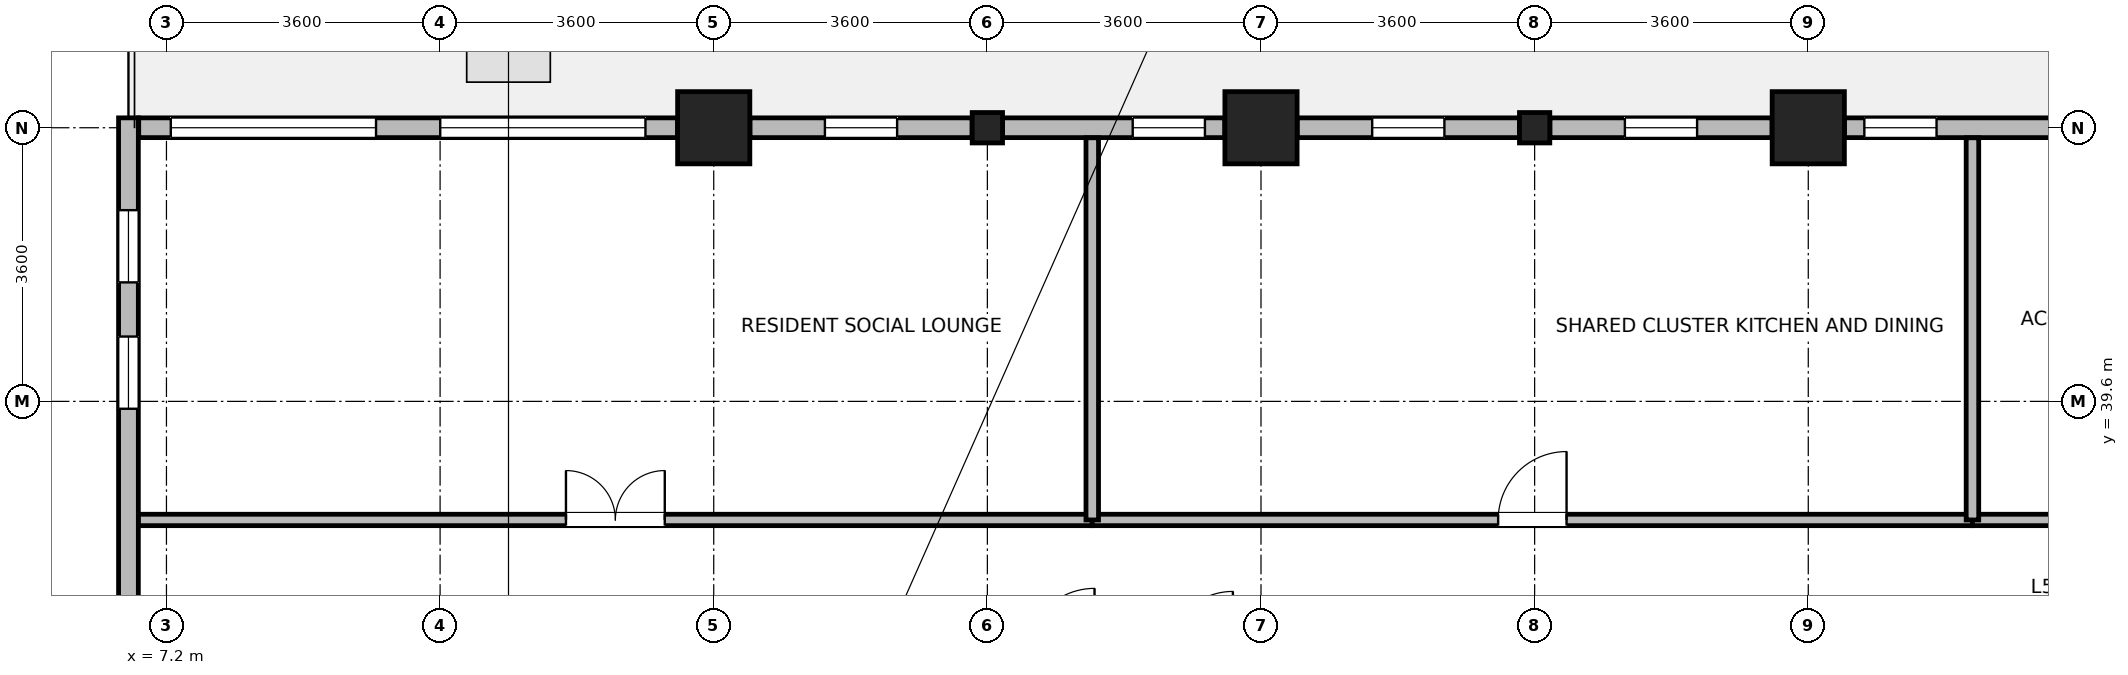
"""IFC4 building model, lengths in metres.
Left out: names, types, materials, properties, quantities, classifications, styles, units other than length and angle.
Written with IfcOpenShell. Run it as: python <this file> out.ifc"""

import sys

from ifc_helpers import new_model, si_unit, direction, frame, frame_2d, origin, origin_2d, place, context, subcontext, project, spatial, rectangle, i_section, extrude, source, transform, mapped, element, fill, save


model = new_model("IFC4")
c1 = context("Model", 3, precision=1e-05, world=origin(), true_north=direction((0.0, 1.0)))
c2 = subcontext(c1, "Body", "Model", "MODEL_VIEW")
j1 = project(units=[si_unit("LENGTHUNIT", "METRE"), si_unit("PLANEANGLEUNIT", "RADIAN")], contexts=[c1])
p1 = place(None, origin())
s1 = spatial("IfcSite", under=j1, at=p1, CompositionType="ELEMENT")
p2 = place(p1, origin())
s2 = spatial("IfcBuilding", under=s1, at=p2, CompositionType="ELEMENT")
p3 = place(p2, frame((0.0, 0.0, 197.2)))
s3 = spatial("IfcBuildingStorey", under=s2, at=p3, CompositionType="ELEMENT", Elevation=197.2)
m1 = source(origin(), c2, "Body", "SweptSolid", [
    extrude(rectangle(XDim=0.95, YDim=0.95, at=origin_2d()), origin(), (0.0, 0.0, 1.0), 4.6),
])
for number, where, z_axis, x_axis in (
    (1, (14.4, 43.2, 0.0), (0.0, 0.0, 1.0), (1.0, 0.0, 0.0)),
    (2, (21.6, 43.2, 0.0), (0.0, 0.0, 1.0), (1.0, 0.0, 0.0)),
    (3, (28.8, 43.2, 0.0), (0.0, 0.0, 1.0), (1.0, 0.0, 0.0)),
):
    element("IfcColumn", number, at=place(p3, frame(where, z_axis=z_axis, x_axis=x_axis)), inside=s3, PredefinedType="COLUMN", context=c2, shape_type="MappedRepresentation", body=[
        mapped(m1, transform((0.0, 0.0, 0.0), x_axis=(1.0, 0.0, 0.0), y_axis=(0.0, 1.0, 0.0), z_axis=(0.0, 0.0, 1.0), scale=1.0)),
    ])
m2 = source(origin(), c2, "Body", "SweptSolid", [
    extrude(i_section(OverallWidth=0.399, OverallDepth=0.4, WebThickness=0.017, FlangeThickness=0.023, FilletRadius=0.015, at=origin_2d()), origin(), (0.0, 0.0, 1.0), 4.6),
])
for number, where, z_axis, x_axis in (
    (4, (18.0, 43.2, 0.0), (0.0, 0.0, 1.0), (1.0, 0.0, 0.0)),
    (5, (25.2, 43.2, 0.0), (0.0, 0.0, 1.0), (1.0, 0.0, 0.0)),
):
    element("IfcColumn", number, at=place(p3, frame(where, z_axis=z_axis, x_axis=x_axis)), inside=s3, PredefinedType="COLUMN", context=c2, shape_type="MappedRepresentation", body=[
        mapped(m2, transform((0.0, 0.0, 0.0), x_axis=(1.0, 0.0, 0.0), y_axis=(0.0, 1.0, 0.0), z_axis=(0.0, 0.0, 1.0), scale=1.0)),
    ])
p4 = place(p3, frame((29.276, 43.2, 0.0), z_axis=(0.0, 0.0, 1.0), x_axis=(1.0, 0.0, 0.0)))
e6 = element("IfcWall", 6, at=p4, inside=s3, PredefinedType="STANDARD", context=c2, shape_type="SweptSolid", body=[
    extrude(rectangle(XDim=2.924, YDim=0.26, at=frame_2d((1.462, 0.0))), origin(), (0.0, 0.0, 1.0), 3.9),
])
p5 = place(p4, frame((0.262, 0.0, 0.85)))
e7 = element("IfcOpeningElement", 7, at=p5, cuts=e6, PredefinedType="OPENING", context=c2, shape_type="SweptSolid", body=[
    extrude(rectangle(XDim=0.95, YDim=1.75, at=frame_2d((0.475, 0.875))), frame((0.0, 0.14, 0.0), z_axis=(0.0, -1.0, 0.0), x_axis=(1.0, 0.0, 0.0)), (0.0, 0.0, 1.0), 0.28),
])
p6 = place(p3, frame((25.4, 43.2, 0.0), z_axis=(0.0, 0.0, 1.0), x_axis=(1.0, 0.0, 0.0)))
e8 = element("IfcWall", 8, at=p6, inside=s3, PredefinedType="STANDARD", context=c2, shape_type="SweptSolid", body=[
    extrude(rectangle(XDim=2.924, YDim=0.26, at=frame_2d((1.462, 0.0))), origin(), (0.0, 0.0, 1.0), 3.9),
])
p7 = place(p6, frame((0.987, 0.0, 0.85)))
e9 = element("IfcOpeningElement", 9, at=p7, cuts=e8, PredefinedType="OPENING", context=c2, shape_type="SweptSolid", body=[
    extrude(rectangle(XDim=0.95, YDim=1.75, at=frame_2d((0.475, 0.875))), frame((0.0, 0.14, 0.0), z_axis=(0.0, -1.0, 0.0), x_axis=(1.0, 0.0, 0.0)), (0.0, 0.0, 1.0), 0.28),
])
p8 = place(p3, frame((22.076, 43.2, 0.0), z_axis=(0.0, 0.0, 1.0), x_axis=(1.0, 0.0, 0.0)))
e10 = element("IfcWall", 10, at=p8, inside=s3, PredefinedType="STANDARD", context=c2, shape_type="SweptSolid", body=[
    extrude(rectangle(XDim=2.924, YDim=0.26, at=frame_2d((1.462, 0.0))), origin(), (0.0, 0.0, 1.0), 3.9),
])
p9 = place(p8, frame((0.987, 0.0, 0.85)))
e11 = element("IfcOpeningElement", 11, at=p9, cuts=e10, PredefinedType="OPENING", context=c2, shape_type="SweptSolid", body=[
    extrude(rectangle(XDim=0.95, YDim=1.75, at=frame_2d((0.475, 0.875))), frame((0.0, 0.14, 0.0), z_axis=(0.0, -1.0, 0.0), x_axis=(1.0, 0.0, 0.0)), (0.0, 0.0, 1.0), 0.28),
])
p10 = place(p3, frame((18.2, 43.2, 0.0), z_axis=(0.0, 0.0, 1.0), x_axis=(1.0, 0.0, 0.0)))
e12 = element("IfcWall", 12, at=p10, inside=s3, PredefinedType="STANDARD", context=c2, shape_type="SweptSolid", body=[
    extrude(rectangle(XDim=2.924, YDim=0.26, at=frame_2d((1.462, 0.0))), origin(), (0.0, 0.0, 1.0), 3.9),
])
p11 = place(p10, frame((1.712, 0.0, 0.85)))
e13 = element("IfcOpeningElement", 13, at=p11, cuts=e12, PredefinedType="OPENING", context=c2, shape_type="SweptSolid", body=[
    extrude(rectangle(XDim=0.95, YDim=1.75, at=frame_2d((0.475, 0.875))), frame((0.0, 0.14, 0.0), z_axis=(0.0, -1.0, 0.0), x_axis=(1.0, 0.0, 0.0)), (0.0, 0.0, 1.0), 0.28),
])
p12 = place(p3, frame((14.876, 43.2, 0.0), z_axis=(0.0, 0.0, 1.0), x_axis=(1.0, 0.0, 0.0)))
e14 = element("IfcWall", 14, at=p12, inside=s3, PredefinedType="STANDARD", context=c2, shape_type="SweptSolid", body=[
    extrude(rectangle(XDim=2.924, YDim=0.26, at=frame_2d((1.462, 0.0))), origin(), (0.0, 0.0, 1.0), 3.9),
])
p13 = place(p12, frame((0.987, 0.0, 0.85)))
e15 = element("IfcOpeningElement", 15, at=p13, cuts=e14, PredefinedType="OPENING", context=c2, shape_type="SweptSolid", body=[
    extrude(rectangle(XDim=0.95, YDim=1.75, at=frame_2d((0.475, 0.875))), frame((0.0, 0.14, 0.0), z_axis=(0.0, -1.0, 0.0), x_axis=(1.0, 0.0, 0.0)), (0.0, 0.0, 1.0), 0.28),
])
p14 = place(p3, frame((6.835, 43.2, 0.0), z_axis=(0.0, 0.0, 1.0), x_axis=(1.0, 0.0, 0.0)))
e16 = element("IfcWall", 16, at=p14, inside=s3, PredefinedType="STANDARD", context=c2, shape_type="SweptSolid", body=[
    extrude(rectangle(XDim=7.089, YDim=0.26, at=frame_2d((3.544, 0.0))), origin(), (0.0, 0.0, 1.0), 4.35),
])
p15 = place(p14, frame((0.422, 0.0, 0.85)))
e17 = element("IfcOpeningElement", 17, at=p15, cuts=e16, PredefinedType="OPENING", context=c2, shape_type="SweptSolid", body=[
    extrude(rectangle(XDim=2.7, YDim=2.05, at=frame_2d((1.35, 1.025))), frame((0.0, 0.14, 0.0), z_axis=(0.0, -1.0, 0.0), x_axis=(1.0, 0.0, 0.0)), (0.0, 0.0, 1.0), 0.28),
])
p16 = place(p14, frame((3.967, 0.0, 0.85)))
e18 = element("IfcOpeningElement", 18, at=p16, cuts=e16, PredefinedType="OPENING", context=c2, shape_type="SweptSolid", body=[
    extrude(rectangle(XDim=2.7, YDim=2.05, at=frame_2d((1.35, 1.025))), frame((0.0, 0.14, 0.0), z_axis=(0.0, -1.0, 0.0), x_axis=(1.0, 0.0, 0.0)), (0.0, 0.0, 1.0), 0.28),
])
p17 = place(p3, frame((6.7, 36.626, 0.0), z_axis=(0.0, 0.0, 1.0), x_axis=(0.0, 1.0, 0.0)))
e19 = element("IfcWall", 19, at=p17, inside=s3, PredefinedType="STANDARD", context=c2, shape_type="SweptSolid", body=[
    extrude(rectangle(XDim=6.704, YDim=0.26, at=frame_2d((3.352, 0.0))), origin(), (0.0, 0.0, 1.0), 4.35),
])
p18 = place(p17, frame((2.877, 0.0, 0.85)))
e20 = element("IfcOpeningElement", 20, at=p18, cuts=e19, PredefinedType="OPENING", context=c2, shape_type="SweptSolid", body=[
    extrude(rectangle(XDim=0.95, YDim=1.75, at=frame_2d((0.475, 0.875))), frame((0.0, 0.14, 0.0), z_axis=(0.0, -1.0, 0.0), x_axis=(1.0, 0.0, 0.0)), (0.0, 0.0, 1.0), 0.28),
])
p19 = place(p17, frame((4.54, 0.0, 0.85)))
e21 = element("IfcOpeningElement", 21, at=p19, cuts=e19, PredefinedType="OPENING", context=c2, shape_type="SweptSolid", body=[
    extrude(rectangle(XDim=0.95, YDim=1.75, at=frame_2d((0.475, 0.875))), frame((0.0, 0.14, 0.0), z_axis=(0.0, -1.0, 0.0), x_axis=(1.0, 0.0, 0.0)), (0.0, 0.0, 1.0), 0.28),
])
p20 = place(p3, frame((6.832, 38.04, 0.0), z_axis=(0.0, 0.0, 1.0), x_axis=(1.0, 0.0, 0.0)))
e22 = element("IfcWall", 22, at=p20, inside=s3, PredefinedType="PARTITIONING", context=c2, shape_type="SweptSolid", body=[
    extrude(rectangle(XDim=12.548, YDim=0.15, at=frame_2d((6.274, 0.0))), origin(), (0.0, 0.0, 1.0), 4.35),
])
p21 = place(p20, frame((5.624, 0.0, 0.0)))
e23 = element("IfcOpeningElement", 23, at=p21, cuts=e22, PredefinedType="OPENING", context=c2, shape_type="SweptSolid", body=[
    extrude(rectangle(XDim=1.3, YDim=2.12, at=frame_2d((0.65, 1.06))), frame((0.0, 0.085, 0.0), z_axis=(0.0, -1.0, 0.0), x_axis=(1.0, 0.0, 0.0)), (0.0, 0.0, 1.0), 0.17),
])
p22 = place(p3, frame((19.38, 38.04, 0.0), z_axis=(0.0, 0.0, 1.0), x_axis=(1.0, 0.0, 0.0)))
e24 = element("IfcWall", 24, at=p22, inside=s3, PredefinedType="PARTITIONING", context=c2, shape_type="SweptSolid", body=[
    extrude(rectangle(XDim=11.58, YDim=0.15, at=frame_2d((5.79, 0.0))), origin(), (0.0, 0.0, 1.0), 4.35),
])
p23 = place(p22, frame((5.34, 0.0, 0.0)))
e25 = element("IfcOpeningElement", 25, at=p23, cuts=e24, PredefinedType="OPENING", context=c2, shape_type="SweptSolid", body=[
    extrude(rectangle(XDim=0.9, YDim=2.08, at=frame_2d((0.45, 1.04))), frame((0.0, 0.085, 0.0), z_axis=(0.0, -1.0, 0.0), x_axis=(1.0, 0.0, 0.0)), (0.0, 0.0, 1.0), 0.17),
])
p24 = place(p3, frame((30.96, 38.04, 0.0), z_axis=(0.0, 0.0, 1.0), x_axis=(1.0, 0.0, 0.0)))
e26 = element("IfcWall", 26, at=p24, inside=s3, PredefinedType="PARTITIONING", context=c2, shape_type="SweptSolid", body=[
    extrude(rectangle(XDim=10.76, YDim=0.15, at=frame_2d((5.38, 0.0))), origin(), (0.0, 0.0, 1.0), 4.35),
])
p25 = place(p24, frame((4.855, 0.0, 0.0)))
e27 = element("IfcOpeningElement", 27, at=p25, cuts=e26, PredefinedType="OPENING", context=c2, shape_type="SweptSolid", body=[
    extrude(rectangle(XDim=1.05, YDim=2.12, at=frame_2d((0.525, 1.06))), frame((0.0, 0.085, 0.0), z_axis=(0.0, -1.0, 0.0), x_axis=(1.0, 0.0, 0.0)), (0.0, 0.0, 1.0), 0.17),
])
for number, where, z_axis, x_axis in (
    (28, (19.38, 38.04, 0.0), (0.0, 0.0, 1.0), (0.0, 1.0, 0.0)),
    (29, (30.96, 38.04, 0.0), (0.0, 0.0, 1.0), (0.0, 1.0, 0.0)),
):
    element("IfcWall", number, at=place(p3, frame(where, z_axis=z_axis, x_axis=x_axis)), inside=s3, PredefinedType="PARTITIONING", context=c2, shape_type="SweptSolid", body=[
        extrude(rectangle(XDim=5.028, YDim=0.165, at=frame_2d((2.514, 0.0))), origin(), (0.0, 0.0, 1.0), 4.35),
    ])
p26 = place(p5, origin())
e30 = element("IfcWindow", 30, at=p26, inside=s3, PartitioningType="SINGLE_PANEL", PredefinedType="WINDOW", context=c2, shape_type="SweptSolid", body=[
    extrude(rectangle(XDim=0.95, YDim=1.75, at=frame_2d((0.475, 0.875))), frame((0.0, 0.03, 0.0), z_axis=(0.0, -1.0, 0.0), x_axis=(1.0, 0.0, 0.0)), (0.0, 0.0, 1.0), 0.06),
])
fill(e7, e30)
p27 = place(p7, origin())
e31 = element("IfcWindow", 31, at=p27, inside=s3, PartitioningType="SINGLE_PANEL", PredefinedType="WINDOW", context=c2, shape_type="SweptSolid", body=[
    extrude(rectangle(XDim=0.95, YDim=1.75, at=frame_2d((0.475, 0.875))), frame((0.0, 0.03, 0.0), z_axis=(0.0, -1.0, 0.0), x_axis=(1.0, 0.0, 0.0)), (0.0, 0.0, 1.0), 0.06),
])
fill(e9, e31)
p28 = place(p9, origin())
e32 = element("IfcWindow", 32, at=p28, inside=s3, PartitioningType="SINGLE_PANEL", PredefinedType="WINDOW", context=c2, shape_type="SweptSolid", body=[
    extrude(rectangle(XDim=0.95, YDim=1.75, at=frame_2d((0.475, 0.875))), frame((0.0, 0.03, 0.0), z_axis=(0.0, -1.0, 0.0), x_axis=(1.0, 0.0, 0.0)), (0.0, 0.0, 1.0), 0.06),
])
fill(e11, e32)
p29 = place(p11, origin())
e33 = element("IfcWindow", 33, at=p29, inside=s3, PartitioningType="SINGLE_PANEL", PredefinedType="WINDOW", context=c2, shape_type="SweptSolid", body=[
    extrude(rectangle(XDim=0.95, YDim=1.75, at=frame_2d((0.475, 0.875))), frame((0.0, 0.03, 0.0), z_axis=(0.0, -1.0, 0.0), x_axis=(1.0, 0.0, 0.0)), (0.0, 0.0, 1.0), 0.06),
])
fill(e13, e33)
p30 = place(p13, origin())
e34 = element("IfcWindow", 34, at=p30, inside=s3, PartitioningType="SINGLE_PANEL", PredefinedType="WINDOW", context=c2, shape_type="SweptSolid", body=[
    extrude(rectangle(XDim=0.95, YDim=1.75, at=frame_2d((0.475, 0.875))), frame((0.0, 0.03, 0.0), z_axis=(0.0, -1.0, 0.0), x_axis=(1.0, 0.0, 0.0)), (0.0, 0.0, 1.0), 0.06),
])
fill(e15, e34)
p31 = place(p15, origin())
e35 = element("IfcWindow", 35, at=p31, inside=s3, PartitioningType="SINGLE_PANEL", PredefinedType="WINDOW", context=c2, shape_type="SweptSolid", body=[
    extrude(rectangle(XDim=2.7, YDim=2.05, at=frame_2d((1.35, 1.025))), frame((0.0, 0.03, 0.0), z_axis=(0.0, -1.0, 0.0), x_axis=(1.0, 0.0, 0.0)), (0.0, 0.0, 1.0), 0.06),
])
fill(e17, e35)
p32 = place(p16, origin())
e36 = element("IfcWindow", 36, at=p32, inside=s3, PartitioningType="SINGLE_PANEL", PredefinedType="WINDOW", context=c2, shape_type="SweptSolid", body=[
    extrude(rectangle(XDim=2.7, YDim=2.05, at=frame_2d((1.35, 1.025))), frame((0.0, 0.03, 0.0), z_axis=(0.0, -1.0, 0.0), x_axis=(1.0, 0.0, 0.0)), (0.0, 0.0, 1.0), 0.06),
])
fill(e18, e36)
p33 = place(p18, origin())
e37 = element("IfcWindow", 37, at=p33, inside=s3, PartitioningType="SINGLE_PANEL", PredefinedType="WINDOW", context=c2, shape_type="SweptSolid", body=[
    extrude(rectangle(XDim=0.95, YDim=1.75, at=frame_2d((0.475, 0.875))), frame((0.0, 0.03, 0.0), z_axis=(0.0, -1.0, 0.0), x_axis=(1.0, 0.0, 0.0)), (0.0, 0.0, 1.0), 0.06),
])
fill(e20, e37)
p34 = place(p19, origin())
e38 = element("IfcWindow", 38, at=p34, inside=s3, PartitioningType="SINGLE_PANEL", PredefinedType="WINDOW", context=c2, shape_type="SweptSolid", body=[
    extrude(rectangle(XDim=0.95, YDim=1.75, at=frame_2d((0.475, 0.875))), frame((0.0, 0.03, 0.0), z_axis=(0.0, -1.0, 0.0), x_axis=(1.0, 0.0, 0.0)), (0.0, 0.0, 1.0), 0.06),
])
fill(e21, e38)
p35 = place(p21, origin())
e39 = element("IfcDoor", 39, at=p35, inside=s3, OperationType="DOUBLE_DOOR_SINGLE_SWING", PredefinedType="DOOR", context=c2, shape_type="SweptSolid", body=[
    extrude(rectangle(XDim=1.3, YDim=2.12, at=frame_2d((0.65, 1.06))), frame((0.0, 0.025, 0.0), z_axis=(0.0, -1.0, 0.0), x_axis=(1.0, 0.0, 0.0)), (0.0, 0.0, 1.0), 0.05),
])
fill(e23, e39)
p36 = place(p23, origin())
e40 = element("IfcDoor", 40, at=p36, inside=s3, OperationType="SINGLE_SWING_RIGHT", PredefinedType="DOOR", context=c2, shape_type="SweptSolid", body=[
    extrude(rectangle(XDim=0.9, YDim=2.08, at=frame_2d((0.45, 1.04))), frame((0.0, 0.025, 0.0), z_axis=(0.0, -1.0, 0.0), x_axis=(1.0, 0.0, 0.0)), (0.0, 0.0, 1.0), 0.05),
])
fill(e25, e40)
save(model, sys.argv[1])
